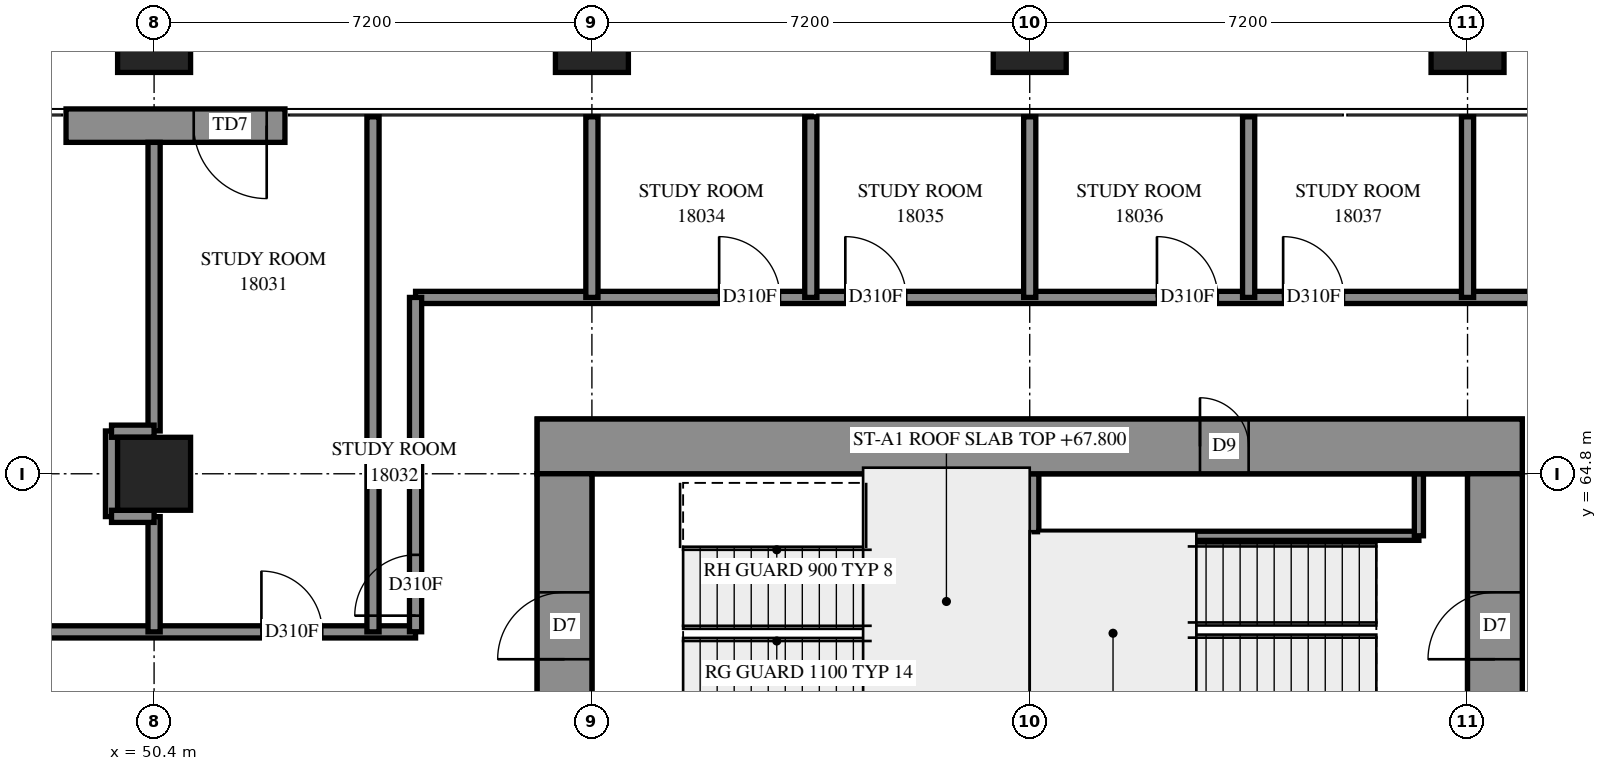
"""IFC4 building model, lengths in metres.
Left out: names, types, materials, properties, quantities, classifications, styles, units other than length and angle.
Written with IfcOpenShell. Run it as: python <this file> out.ifc"""

import sys

from ifc_helpers import new_model, si_unit, direction, frame, frame_2d, origin, origin_2d, place, context, subcontext, project, spatial, rectangle, extrude, element, fill, save


model = new_model("IFC4")
c1 = context("Model", 3, precision=1e-05, world=origin(), true_north=direction((0.0, 1.0)))
c2 = subcontext(c1, "Body", "Model", "MODEL_VIEW")
j1 = project(units=[si_unit("LENGTHUNIT", "METRE"), si_unit("PLANEANGLEUNIT", "RADIAN")], contexts=[c1])
p1 = place(None, origin())
s1 = spatial("IfcSite", under=j1, at=p1, CompositionType="ELEMENT")
p2 = place(p1, origin())
s2 = spatial("IfcBuilding", under=s1, at=p2, CompositionType="ELEMENT")
p3 = place(p2, frame((0.0, 0.0, 67.8)))
s3 = spatial("IfcBuildingStorey", under=s2, at=p3, CompositionType="ELEMENT", Elevation=67.8)
for number, where, z_axis, x_axis in (
    (1, (50.4, 64.8, 0.0), (0.0, 0.0, 1.0), (1.0, 0.0, 0.0)),
    (2, (50.4, 72.0, 0.0), (0.0, 0.0, 1.0), (1.0, 0.0, 0.0)),
    (3, (57.6, 72.0, 0.0), (0.0, 0.0, 1.0), (1.0, 0.0, 0.0)),
    (4, (64.8, 72.0, 0.0), (0.0, 0.0, 1.0), (1.0, 0.0, 0.0)),
    (5, (72.0, 72.0, 0.0), (0.0, 0.0, 1.0), (1.0, 0.0, 0.0)),
):
    element("IfcColumn", number, at=place(p3, frame(where, z_axis=z_axis, x_axis=x_axis)), inside=s3, PredefinedType="COLUMN", context=c2, shape_type="SweptSolid", body=[
        extrude(rectangle(XDim=1.2, YDim=1.2, at=origin_2d()), origin(), (0.0, 0.0, 1.0), 3.9),
    ])
p4 = place(p3, frame((56.7, 65.25, -0.3), z_axis=(0.0, 0.0, 1.0), x_axis=(1.0, 0.0, 0.0)))
e6 = element("IfcWall", 6, at=p4, inside=s3, PredefinedType="SHEAR", context=c2, shape_type="SweptSolid", body=[
    extrude(rectangle(XDim=16.2, YDim=0.9, at=frame_2d((8.1, 0.0))), origin(), (0.0, 0.0, 1.0), 3.5),
])
p5 = place(p4, frame((10.9, 0.0, 0.3)))
e7 = element("IfcOpeningElement", 7, at=p5, cuts=e6, PredefinedType="OPENING", context=c2, shape_type="SweptSolid", body=[
    extrude(rectangle(XDim=0.8, YDim=2.1, at=frame_2d((0.4, 1.05))), frame((0.0, 0.46, 0.0), z_axis=(0.0, -1.0, 0.0), x_axis=(1.0, 0.0, 0.0)), (0.0, 0.0, 1.0), 0.92),
])
p6 = place(p3, frame((57.15, 50.4, -0.3), z_axis=(0.0, 0.0, 1.0), x_axis=(0.0, 1.0, 0.0)))
e8 = element("IfcWall", 8, at=p6, inside=s3, PredefinedType="SHEAR", context=c2, shape_type="SweptSolid", body=[
    extrude(rectangle(XDim=14.4, YDim=0.9, at=frame_2d((7.2, 0.0))), origin(), (0.0, 0.0, 1.0), 3.5),
])
p7 = place(p6, frame((4.55, 0.0, 0.3)))
e9 = element("IfcOpeningElement", 9, at=p7, cuts=e8, PredefinedType="OPENING", context=c2, shape_type="SweptSolid", body=[
    extrude(rectangle(XDim=1.1, YDim=2.1, at=frame_2d((0.55, 1.05))), frame((0.0, 0.46, 0.0), z_axis=(0.0, -1.0, 0.0), x_axis=(1.0, 0.0, 0.0)), (0.0, 0.0, 1.0), 0.92),
])
p8 = place(p6, frame((11.35, 0.0, 0.3)))
e10 = element("IfcOpeningElement", 10, at=p8, cuts=e8, PredefinedType="OPENING", context=c2, shape_type="SweptSolid", body=[
    extrude(rectangle(XDim=1.1, YDim=2.1, at=frame_2d((0.55, 1.05))), frame((0.0, 0.46, 0.0), z_axis=(0.0, -1.0, 0.0), x_axis=(1.0, 0.0, 0.0)), (0.0, 0.0, 1.0), 0.92),
])
p9 = place(p3, frame((72.45, 50.4, -0.3), z_axis=(0.0, 0.0, 1.0), x_axis=(0.0, 1.0, 0.0)))
e11 = element("IfcWall", 11, at=p9, inside=s3, PredefinedType="SHEAR", context=c2, shape_type="SweptSolid", body=[
    extrude(rectangle(XDim=14.4, YDim=0.9, at=frame_2d((7.2, 0.0))), origin(), (0.0, 0.0, 1.0), 3.5),
])
p10 = place(p9, frame((4.55, 0.0, 0.3)))
e12 = element("IfcOpeningElement", 12, at=p10, cuts=e11, PredefinedType="OPENING", context=c2, shape_type="SweptSolid", body=[
    extrude(rectangle(XDim=1.1, YDim=2.1, at=frame_2d((0.55, 1.05))), frame((0.0, 0.46, 0.0), z_axis=(0.0, -1.0, 0.0), x_axis=(1.0, 0.0, 0.0)), (0.0, 0.0, 1.0), 0.92),
])
p11 = place(p9, frame((11.35, 0.0, 0.3)))
e13 = element("IfcOpeningElement", 13, at=p11, cuts=e11, PredefinedType="OPENING", context=c2, shape_type="SweptSolid", body=[
    extrude(rectangle(XDim=1.1, YDim=2.1, at=frame_2d((0.55, 1.05))), frame((0.0, 0.46, 0.0), z_axis=(0.0, -1.0, 0.0), x_axis=(1.0, 0.0, 0.0)), (0.0, 0.0, 1.0), 0.92),
])
p12 = place(p3, frame((64.8, 60.6, 0.0), z_axis=(0.0, 0.0, 1.0), x_axis=(0.0, 1.0, 0.0)))
e14 = element("IfcWall", 14, at=p12, inside=s3, PredefinedType="SOLIDWALL", context=c2, shape_type="SweptSolid", body=[
    extrude(rectangle(XDim=4.2, YDim=0.3, at=frame_2d((2.1, 0.0))), origin(), (0.0, 0.0, 1.0), 3.9),
])
p13 = place(p3, frame((52.552, 70.525, 0.0), z_axis=(0.0, 0.0, 1.0), x_axis=(-1.0, 0.0, 0.0)))
e15 = element("IfcWall", 15, at=p13, inside=s3, PredefinedType="SOLIDWALL", context=c2, shape_type="SweptSolid", body=[
    extrude(rectangle(XDim=3.6, YDim=0.55, at=frame_2d((1.8, 0.0))), origin(), (0.0, 0.0, 1.0), 3.9),
])
p14 = place(p13, frame((0.3, 0.0, 0.0)))
e16 = element("IfcOpeningElement", 16, at=p14, cuts=e15, PredefinedType="OPENING", context=c2, shape_type="SweptSolid", body=[
    extrude(rectangle(XDim=1.2, YDim=2.4, at=frame_2d((0.6, 1.2))), frame((0.0, 0.285, 0.0), z_axis=(0.0, -1.0, 0.0), x_axis=(1.0, 0.0, 0.0)), (0.0, 0.0, 1.0), 0.57),
])
p15 = place(p3, frame((64.95, 63.78, 0.0), z_axis=(0.0, 0.0, 1.0), x_axis=(1.0, 0.0, 0.0)))
e17 = element("IfcWall", 17, at=p15, inside=s3, PredefinedType="PARTITIONING", context=c2, shape_type="SweptSolid", body=[
    extrude(rectangle(XDim=6.25, YDim=0.15, at=frame_2d((3.125, 0.0))), origin(), (0.0, 0.0, 1.0), 3.9),
])
p16 = place(p3, frame((71.2, 63.78, 0.0), z_axis=(0.0, 0.0, 1.0), x_axis=(0.0, 1.0, 0.0)))
e18 = element("IfcWall", 18, at=p16, inside=s3, PredefinedType="PARTITIONING", context=c2, shape_type="SweptSolid", body=[
    extrude(rectangle(XDim=1.02, YDim=0.15, at=frame_2d((0.51, 0.0))), origin(), (0.0, 0.0, 1.0), 3.9),
])
p17 = place(p3, frame((33.4, 62.2, 0.0), z_axis=(0.0, 0.0, 1.0), x_axis=(1.0, 0.0, 0.0)))
e19 = element("IfcWall", 19, at=p17, inside=s3, PredefinedType="PARTITIONING", context=c2, shape_type="SweptSolid", body=[
    extrude(rectangle(XDim=21.3, YDim=0.2, at=frame_2d((10.65, 0.0))), origin(), (0.0, 0.0, 1.0), 3.9),
])
p18 = place(p17, frame((6.157, 0.0, 0.0)))
e20 = element("IfcOpeningElement", 20, at=p18, cuts=e19, PredefinedType="OPENING", context=c2, shape_type="SweptSolid", body=[
    extrude(rectangle(XDim=1.0, YDim=2.1, at=frame_2d((0.5, 1.05))), frame((0.0, 0.11, 0.0), z_axis=(0.0, -1.0, 0.0), x_axis=(1.0, 0.0, 0.0)), (0.0, 0.0, 1.0), 0.22),
])
p19 = place(p17, frame((13.357, 0.0, 0.0)))
e21 = element("IfcOpeningElement", 21, at=p19, cuts=e19, PredefinedType="OPENING", context=c2, shape_type="SweptSolid", body=[
    extrude(rectangle(XDim=1.0, YDim=2.1, at=frame_2d((0.5, 1.05))), frame((0.0, 0.11, 0.0), z_axis=(0.0, -1.0, 0.0), x_axis=(1.0, 0.0, 0.0)), (0.0, 0.0, 1.0), 0.22),
])
p20 = place(p17, frame((18.765, 0.0, 0.0)))
e22 = element("IfcOpeningElement", 22, at=p20, cuts=e19, PredefinedType="OPENING", context=c2, shape_type="SweptSolid", body=[
    extrude(rectangle(XDim=1.0, YDim=2.1, at=frame_2d((0.5, 1.05))), frame((0.0, 0.11, 0.0), z_axis=(0.0, -1.0, 0.0), x_axis=(1.0, 0.0, 0.0)), (0.0, 0.0, 1.0), 0.22),
])
p21 = place(p3, frame((54.7, 67.7, 0.0), z_axis=(0.0, 0.0, 1.0), x_axis=(1.0, 0.0, 0.0)))
e23 = element("IfcWall", 23, at=p21, inside=s3, PredefinedType="PARTITIONING", context=c2, shape_type="SweptSolid", body=[
    extrude(rectangle(XDim=20.2, YDim=0.2, at=frame_2d((10.1, 0.0))), origin(), (0.0, 0.0, 1.0), 3.9),
])
p22 = place(p21, frame((4.992, 0.0, 0.0)))
e24 = element("IfcOpeningElement", 24, at=p22, cuts=e23, PredefinedType="OPENING", context=c2, shape_type="SweptSolid", body=[
    extrude(rectangle(XDim=1.0, YDim=2.1, at=frame_2d((0.5, 1.05))), frame((0.0, 0.11, 0.0), z_axis=(0.0, -1.0, 0.0), x_axis=(1.0, 0.0, 0.0)), (0.0, 0.0, 1.0), 0.22),
])
p23 = place(p21, frame((7.067, 0.0, 0.0)))
e25 = element("IfcOpeningElement", 25, at=p23, cuts=e23, PredefinedType="OPENING", context=c2, shape_type="SweptSolid", body=[
    extrude(rectangle(XDim=1.0, YDim=2.1, at=frame_2d((0.5, 1.05))), frame((0.0, 0.11, 0.0), z_axis=(0.0, -1.0, 0.0), x_axis=(1.0, 0.0, 0.0)), (0.0, 0.0, 1.0), 0.22),
])
p24 = place(p21, frame((12.193, 0.0, 0.0)))
e26 = element("IfcOpeningElement", 26, at=p24, cuts=e23, PredefinedType="OPENING", context=c2, shape_type="SweptSolid", body=[
    extrude(rectangle(XDim=1.0, YDim=2.1, at=frame_2d((0.5, 1.05))), frame((0.0, 0.11, 0.0), z_axis=(0.0, -1.0, 0.0), x_axis=(1.0, 0.0, 0.0)), (0.0, 0.0, 1.0), 0.22),
])
p25 = place(p21, frame((14.268, 0.0, 0.0)))
e27 = element("IfcOpeningElement", 27, at=p25, cuts=e23, PredefinedType="OPENING", context=c2, shape_type="SweptSolid", body=[
    extrude(rectangle(XDim=1.0, YDim=2.1, at=frame_2d((0.5, 1.05))), frame((0.0, 0.11, 0.0), z_axis=(0.0, -1.0, 0.0), x_axis=(1.0, 0.0, 0.0)), (0.0, 0.0, 1.0), 0.22),
])
p26 = place(p3, frame((54.0, 62.2, 0.0), z_axis=(0.0, 0.0, 1.0), x_axis=(0.0, 1.0, 0.0)))
e28 = element("IfcWall", 28, at=p26, inside=s3, PredefinedType="PARTITIONING", context=c2, shape_type="SweptSolid", body=[
    extrude(rectangle(XDim=8.47, YDim=0.2, at=frame_2d((4.235, 0.0))), origin(), (0.0, 0.0, 1.0), 3.9),
])
p27 = place(p3, frame((54.7, 62.202, 0.0), z_axis=(0.0, 0.0, 1.0), x_axis=(0.0, 1.0, 0.0)))
e29 = element("IfcWall", 29, at=p27, inside=s3, PredefinedType="PARTITIONING", context=c2, shape_type="SweptSolid", body=[
    extrude(rectangle(XDim=5.498, YDim=0.2, at=frame_2d((2.749, 0.0))), origin(), (0.0, 0.0, 1.0), 3.9),
])
p28 = place(p27, frame((0.265, 0.0, 0.0)))
e30 = element("IfcOpeningElement", 30, at=p28, cuts=e29, PredefinedType="OPENING", context=c2, shape_type="SweptSolid", body=[
    extrude(rectangle(XDim=1.0, YDim=2.1, at=frame_2d((0.5, 1.05))), frame((0.0, 0.11, 0.0), z_axis=(0.0, -1.0, 0.0), x_axis=(1.0, 0.0, 0.0)), (0.0, 0.0, 1.0), 0.22),
])
p29 = place(p3, frame((50.4, 65.504, 0.0), z_axis=(0.0, 0.0, 1.0), x_axis=(0.0, 1.0, 0.0)))
e31 = element("IfcWall", 31, at=p29, inside=s3, PredefinedType="PARTITIONING", context=c2, shape_type="SweptSolid", body=[
    extrude(rectangle(XDim=4.746, YDim=0.2, at=frame_2d((2.373, 0.0))), origin(), (0.0, 0.0, 1.0), 3.9),
])
for number, where, z_axis, x_axis in (
    (32, (57.6, 67.7, 0.0), (0.0, 0.0, 1.0), (0.0, 1.0, 0.0)),
    (33, (61.2, 67.7, 0.0), (0.0, 0.0, 1.0), (0.0, 1.0, 0.0)),
    (34, (64.8, 67.7, 0.0), (0.0, 0.0, 1.0), (0.0, 1.0, 0.0)),
    (35, (68.4, 67.7, 0.0), (0.0, 0.0, 1.0), (0.0, 1.0, 0.0)),
    (36, (72.0, 67.7, 0.0), (0.0, 0.0, 1.0), (0.0, 1.0, 0.0)),
):
    element("IfcWall", number, at=place(p3, frame(where, z_axis=z_axis, x_axis=x_axis)), inside=s3, PredefinedType="PARTITIONING", context=c2, shape_type="SweptSolid", body=[
        extrude(rectangle(XDim=2.97, YDim=0.2, at=frame_2d((1.485, 0.0))), origin(), (0.0, 0.0, 1.0), 3.9),
    ])
p30 = place(p3, frame((50.4, 62.2, 0.0), z_axis=(0.0, 0.0, 1.0), x_axis=(0.0, 1.0, 0.0)))
e37 = element("IfcWall", 37, at=p30, inside=s3, PredefinedType="PARTITIONING", context=c2, shape_type="SweptSolid", body=[
    extrude(rectangle(XDim=1.896, YDim=0.2, at=frame_2d((0.948, 0.0))), origin(), (0.0, 0.0, 1.0), 3.9),
])
p31 = place(p3, frame((49.7, 64.096, 0.0), z_axis=(0.0, 0.0, 1.0), x_axis=(0.0, 1.0, 0.0)))
e38 = element("IfcWall", 38, at=p31, inside=s3, PredefinedType="PARTITIONING", context=c2, shape_type="SweptSolid", body=[
    extrude(rectangle(XDim=1.408, YDim=0.2, at=frame_2d((0.704, 0.0))), origin(), (0.0, 0.0, 1.0), 3.9),
])
for number, where, z_axis, x_axis in (
    (39, (49.7, 65.5, 0.0), (0.0, 0.0, 1.0), (1.0, 0.0, 0.0)),
    (40, (49.7, 64.1, 0.0), (0.0, 0.0, 1.0), (1.0, 0.0, 0.0)),
):
    element("IfcWall", number, at=place(p3, frame(where, z_axis=z_axis, x_axis=x_axis)), inside=s3, PredefinedType="PARTITIONING", context=c2, shape_type="SweptSolid", body=[
        extrude(rectangle(XDim=0.7, YDim=0.2, at=frame_2d((0.35, 0.0))), origin(), (0.0, 0.0, 1.0), 3.9),
    ])
p32 = place(p14, origin())
e41 = element("IfcDoor", 41, at=p32, inside=s3, OperationType="SINGLE_SWING_LEFT", PredefinedType="DOOR", context=c2, shape_type="SweptSolid", body=[
    extrude(rectangle(XDim=1.2, YDim=2.4, at=frame_2d((0.6, 1.2))), frame((0.0, 0.025, 0.0), z_axis=(0.0, -1.0, 0.0), x_axis=(1.0, 0.0, 0.0)), (0.0, 0.0, 1.0), 0.05),
])
fill(e16, e41)
p33 = place(p5, origin())
e42 = element("IfcDoor", 42, at=p33, inside=s3, OperationType="SINGLE_SWING_RIGHT", PredefinedType="DOOR", context=c2, shape_type="SweptSolid", body=[
    extrude(rectangle(XDim=0.8, YDim=2.1, at=frame_2d((0.4, 1.05))), frame((0.0, -0.39, 0.0), z_axis=(0.0, -1.0, 0.0), x_axis=(1.0, 0.0, 0.0)), (0.0, 0.0, 1.0), 0.05),
])
fill(e7, e42)
p34 = place(p8, origin())
e43 = element("IfcDoor", 43, at=p34, inside=s3, OperationType="SINGLE_SWING_LEFT", PredefinedType="DOOR", context=c2, shape_type="SweptSolid", body=[
    extrude(rectangle(XDim=1.1, YDim=2.1, at=frame_2d((0.55, 1.05))), frame((0.0, 0.025, 0.0), z_axis=(0.0, -1.0, 0.0), x_axis=(1.0, 0.0, 0.0)), (0.0, 0.0, 1.0), 0.05),
])
fill(e10, e43)
p35 = place(p11, origin())
e44 = element("IfcDoor", 44, at=p35, inside=s3, OperationType="SINGLE_SWING_RIGHT", PredefinedType="DOOR", context=c2, shape_type="SweptSolid", body=[
    extrude(rectangle(XDim=1.1, YDim=2.1, at=frame_2d((0.55, 1.05))), frame((0.0, 0.025, 0.0), z_axis=(0.0, -1.0, 0.0), x_axis=(1.0, 0.0, 0.0)), (0.0, 0.0, 1.0), 0.05),
])
fill(e13, e44)
p36 = place(p20, origin())
e45 = element("IfcDoor", 45, at=p36, inside=s3, OperationType="SINGLE_SWING_RIGHT", PredefinedType="DOOR", context=c2, shape_type="SweptSolid", body=[
    extrude(rectangle(XDim=1.0, YDim=2.1, at=frame_2d((0.5, 1.05))), frame((0.0, 0.025, 0.0), z_axis=(0.0, -1.0, 0.0), x_axis=(1.0, 0.0, 0.0)), (0.0, 0.0, 1.0), 0.05),
])
fill(e22, e45)
p37 = place(p28, origin())
e46 = element("IfcDoor", 46, at=p37, inside=s3, OperationType="SINGLE_SWING_LEFT", PredefinedType="DOOR", context=c2, shape_type="SweptSolid", body=[
    extrude(rectangle(XDim=1.0, YDim=2.1, at=frame_2d((0.5, 1.05))), frame((0.0, 0.025, 0.0), z_axis=(0.0, -1.0, 0.0), x_axis=(1.0, 0.0, 0.0)), (0.0, 0.0, 1.0), 0.05),
])
fill(e30, e46)
p38 = place(p22, origin())
e47 = element("IfcDoor", 47, at=p38, inside=s3, OperationType="SINGLE_SWING_RIGHT", PredefinedType="DOOR", context=c2, shape_type="SweptSolid", body=[
    extrude(rectangle(XDim=1.0, YDim=2.1, at=frame_2d((0.5, 1.05))), frame((0.0, 0.025, 0.0), z_axis=(0.0, -1.0, 0.0), x_axis=(1.0, 0.0, 0.0)), (0.0, 0.0, 1.0), 0.05),
])
fill(e24, e47)
p39 = place(p23, origin())
e48 = element("IfcDoor", 48, at=p39, inside=s3, OperationType="SINGLE_SWING_LEFT", PredefinedType="DOOR", context=c2, shape_type="SweptSolid", body=[
    extrude(rectangle(XDim=1.0, YDim=2.1, at=frame_2d((0.5, 1.05))), frame((0.0, 0.025, 0.0), z_axis=(0.0, -1.0, 0.0), x_axis=(1.0, 0.0, 0.0)), (0.0, 0.0, 1.0), 0.05),
])
fill(e25, e48)
p40 = place(p24, origin())
e49 = element("IfcDoor", 49, at=p40, inside=s3, OperationType="SINGLE_SWING_RIGHT", PredefinedType="DOOR", context=c2, shape_type="SweptSolid", body=[
    extrude(rectangle(XDim=1.0, YDim=2.1, at=frame_2d((0.5, 1.05))), frame((0.0, 0.025, 0.0), z_axis=(0.0, -1.0, 0.0), x_axis=(1.0, 0.0, 0.0)), (0.0, 0.0, 1.0), 0.05),
])
fill(e26, e49)
p41 = place(p25, origin())
e50 = element("IfcDoor", 50, at=p41, inside=s3, OperationType="SINGLE_SWING_LEFT", PredefinedType="DOOR", context=c2, shape_type="SweptSolid", body=[
    extrude(rectangle(XDim=1.0, YDim=2.1, at=frame_2d((0.5, 1.05))), frame((0.0, 0.025, 0.0), z_axis=(0.0, -1.0, 0.0), x_axis=(1.0, 0.0, 0.0)), (0.0, 0.0, 1.0), 0.05),
])
fill(e27, e50)
save(model, sys.argv[1])
